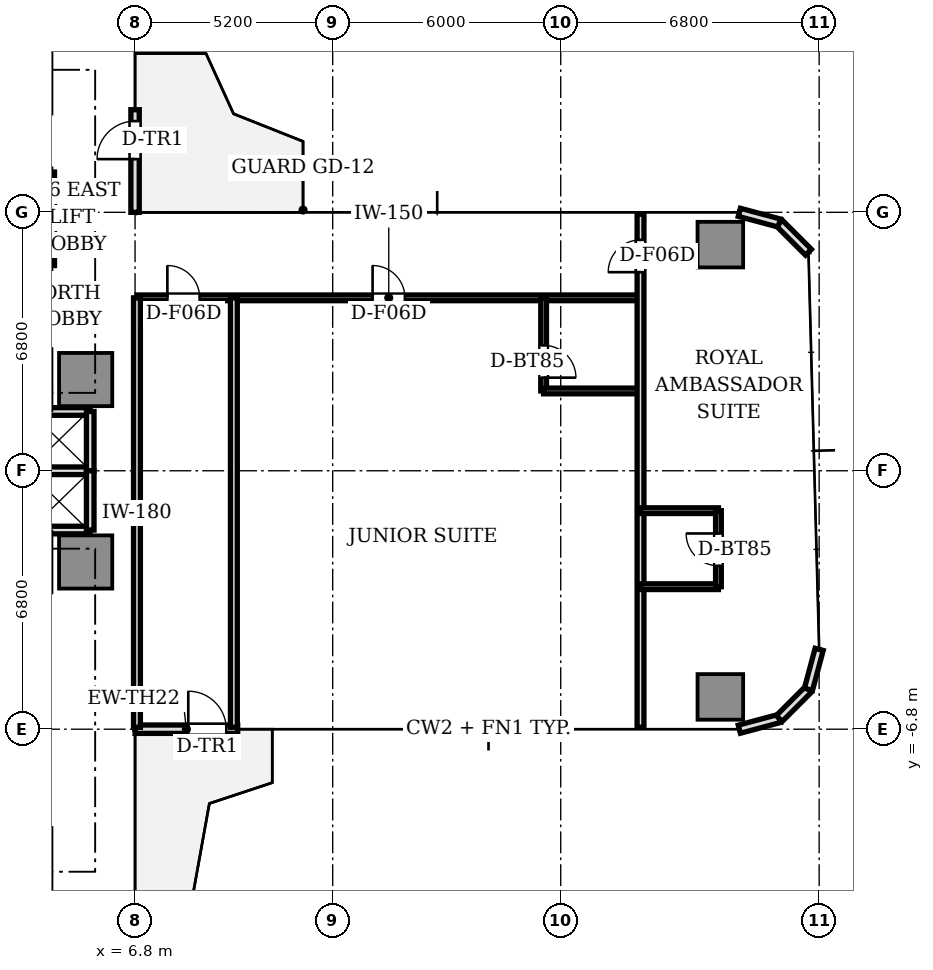
"""IFC4 building model, lengths in metres.
Left out: names, types, materials, properties, quantities, classifications, styles, units other than length and angle.
Written with IfcOpenShell. Run it as: python <this file> out.ifc"""

import sys

from ifc_helpers import new_model, si_unit, direction, frame, frame_2d, origin, origin_2d, place, context, subcontext, project, spatial, rectangle, extrude, source, transform, mapped, element, fill, save


model = new_model("IFC4")
c1 = context("Model", 3, precision=1e-05, world=origin(), true_north=direction((0.0, 1.0)))
c2 = subcontext(c1, "Body", "Model", "MODEL_VIEW")
j1 = project(units=[si_unit("LENGTHUNIT", "METRE"), si_unit("PLANEANGLEUNIT", "RADIAN")], contexts=[c1])
p1 = place(None, origin())
s1 = spatial("IfcSite", under=j1, at=p1, CompositionType="ELEMENT")
p2 = place(p1, origin())
s2 = spatial("IfcBuilding", under=s1, at=p2, CompositionType="ELEMENT")
p3 = place(p2, frame((0.0, 0.0, 61.1)))
s3 = spatial("IfcBuildingStorey", under=s2, at=p3, CompositionType="ELEMENT", Elevation=61.1)
m1 = source(origin(), c2, "Body", "SweptSolid", [
    extrude(rectangle(XDim=1.4, YDim=1.4, at=origin_2d()), origin(), (0.0, 0.0, 1.0), 3.11),
])
for number, where, z_axis, x_axis in (
    (1, (5.5, 2.4, 0.0), (0.0, 0.0, 1.0), (1.0, 0.0, 0.0)),
    (2, (5.5, -2.4, 0.0), (0.0, 0.0, 1.0), (1.0, 0.0, 0.0)),
):
    element("IfcColumn", number, at=place(p3, frame(where, z_axis=z_axis, x_axis=x_axis)), inside=s3, PredefinedType="COLUMN", context=c2, shape_type="MappedRepresentation", body=[
        mapped(m1, transform((0.0, 0.0, 0.0), scale=1.0)),
    ])
m2 = source(origin(), c2, "Body", "SweptSolid", [
    extrude(rectangle(XDim=1.2, YDim=1.2, at=origin_2d()), origin(), (0.0, 0.0, 1.0), 3.11),
])
for number, where, z_axis, x_axis in (
    (3, (22.2, -5.95, 0.0), (0.0, 0.0, 1.0), (1.0, 0.0, 0.0)),
    (4, (22.2, 5.95, 0.0), (0.0, 0.0, 1.0), (1.0, 0.0, 0.0)),
):
    element("IfcColumn", number, at=place(p3, frame(where, z_axis=z_axis, x_axis=x_axis)), inside=s3, PredefinedType="COLUMN", context=c2, shape_type="MappedRepresentation", body=[
        mapped(m2, transform((0.0, 0.0, 0.0), scale=1.0)),
    ])
p4 = place(p3, frame((6.8, -6.8, 0.0), z_axis=(0.0, 0.0, 1.0), x_axis=(1.0, 0.0, 0.0)))
e5 = element("IfcWall", 5, at=p4, inside=s3, PredefinedType="STANDARD", context=c2, shape_type="SweptSolid", body=[
    extrude(rectangle(XDim=2.7, YDim=0.22, at=frame_2d((1.35, 0.0))), origin(), (0.0, 0.0, 1.0), 3.11),
])
p5 = place(p4, frame((1.4, 0.0, 0.0)))
e6 = element("IfcOpeningElement", 6, at=p5, cuts=e5, PredefinedType="OPENING", context=c2, shape_type="SweptSolid", body=[
    extrude(rectangle(XDim=1.0, YDim=2.2, at=frame_2d((0.5, 1.1))), frame((0.0, 0.12, 0.0), z_axis=(0.0, -1.0, 0.0), x_axis=(1.0, 0.0, 0.0)), (0.0, 0.0, 1.0), 0.24),
])
for number, where, z_axis, x_axis in (
    (7, (22.7, -6.8, 0.0), (0.0, 0.0, 1.0), (0.966, 0.259, 0.0)),
    (8, (23.75, -6.519, 0.0), (0.0, 0.0, 1.0), (0.707, 0.707, 0.0)),
    (9, (24.519, -5.75, 0.0), (0.0, 0.0, 1.0), (0.259, 0.966, 0.0)),
    (10, (24.519, 5.75, 0.0), (0.0, 0.0, 1.0), (-0.707, 0.707, 0.0)),
    (11, (23.75, 6.519, 0.0), (0.0, 0.0, 1.0), (-0.966, 0.259, 0.0)),
):
    element("IfcWall", number, at=place(p3, frame(where, z_axis=z_axis, x_axis=x_axis)), inside=s3, PredefinedType="STANDARD", context=c2, shape_type="SweptSolid", body=[
        extrude(rectangle(XDim=1.087, YDim=0.22, at=frame_2d((0.543, 0.0))), origin(), (0.0, 0.0, 1.0), 3.11),
    ])
p6 = place(p3, frame((6.8, 6.8, 0.0), z_axis=(0.0, 0.0, 1.0), x_axis=(0.0, 1.0, 0.0)))
e12 = element("IfcWall", 12, at=p6, inside=s3, PredefinedType="STANDARD", context=c2, shape_type="SweptSolid", body=[
    extrude(rectangle(XDim=2.7, YDim=0.22, at=frame_2d((1.35, 0.0))), origin(), (0.0, 0.0, 1.0), 3.11),
])
p7 = place(p6, frame((1.4, 0.0, 0.0)))
e13 = element("IfcOpeningElement", 13, at=p7, cuts=e12, PredefinedType="OPENING", context=c2, shape_type="SweptSolid", body=[
    extrude(rectangle(XDim=1.0, YDim=2.2, at=frame_2d((0.5, 1.1))), frame((0.0, 0.12, 0.0), z_axis=(0.0, -1.0, 0.0), x_axis=(1.0, 0.0, 0.0)), (0.0, 0.0, 1.0), 0.24),
])
for number, where, z_axis, x_axis in (
    (14, (3.98, 1.56, 0.0), (0.0, 0.0, 1.0), (1.0, 0.0, 0.0)),
    (15, (3.98, -1.56, 0.0), (0.0, 0.0, 1.0), (1.0, 0.0, 0.0)),
    (16, (3.98, 0.0, 0.0), (0.0, 0.0, 1.0), (1.0, 0.0, 0.0)),
):
    element("IfcWall", number, at=place(p3, frame(where, z_axis=z_axis, x_axis=x_axis)), inside=s3, PredefinedType="SOLIDWALL", context=c2, shape_type="SweptSolid", body=[
        extrude(rectangle(XDim=1.64, YDim=0.2, at=frame_2d((0.82, 0.0))), origin(), (0.0, 0.0, 1.0), 2.66),
    ])
for number, where, z_axis, x_axis in (
    (17, (5.62, 0.0, 0.0), (0.0, 0.0, 1.0), (0.0, 1.0, 0.0)),
    (18, (5.62, -1.56, 0.0), (0.0, 0.0, 1.0), (0.0, 1.0, 0.0)),
):
    element("IfcWall", number, at=place(p3, frame(where, z_axis=z_axis, x_axis=x_axis)), inside=s3, PredefinedType="SOLIDWALL", context=c2, shape_type="SweptSolid", body=[
        extrude(rectangle(XDim=1.56, YDim=0.2, at=frame_2d((0.78, 0.0))), origin(), (0.0, 0.0, 1.0), 2.66),
    ])
p8 = place(p3, frame((4.58, 5.4, 0.0), z_axis=(0.0, 0.0, 1.0), x_axis=(0.0, 1.0, 0.0)))
e19 = element("IfcWall", 19, at=p8, inside=s3, PredefinedType="SOLIDWALL", context=c2, shape_type="SweptSolid", body=[
    extrude(rectangle(XDim=2.46, YDim=0.2, at=frame_2d((1.23, 0.0))), origin(), (0.0, 0.0, 1.0), 2.66),
])
p9 = place(p8, frame((0.2, 0.0, 0.0)))
e20 = element("IfcOpeningElement", 20, at=p9, cuts=e19, PredefinedType="OPENING", context=c2, shape_type="SweptSolid", body=[
    extrude(rectangle(XDim=0.85, YDim=2.1, at=frame_2d((0.425, 1.05))), frame((0.0, 0.11, 0.0), z_axis=(0.0, -1.0, 0.0), x_axis=(1.0, 0.0, 0.0)), (0.0, 0.0, 1.0), 0.22),
])
p10 = place(p8, frame((1.38, 0.0, 0.0)))
e21 = element("IfcOpeningElement", 21, at=p10, cuts=e19, PredefinedType="OPENING", context=c2, shape_type="SweptSolid", body=[
    extrude(rectangle(XDim=0.85, YDim=2.1, at=frame_2d((0.425, 1.05))), frame((0.0, 0.11, 0.0), z_axis=(0.0, -1.0, 0.0), x_axis=(1.0, 0.0, 0.0)), (0.0, 0.0, 1.0), 0.22),
])
p11 = place(p3, frame((6.85, 4.55, 0.0), z_axis=(0.0, 0.0, 1.0), x_axis=(1.0, 0.0, 0.0)))
e22 = element("IfcWall", 22, at=p11, inside=s3, PredefinedType="PARTITIONING", context=c2, shape_type="SweptSolid", body=[
    extrude(rectangle(XDim=13.25, YDim=0.15, at=frame_2d((6.625, 0.0))), origin(), (0.0, 0.0, 1.0), 2.63),
])
p12 = place(p11, frame((0.8, 0.0, 0.0)))
e23 = element("IfcOpeningElement", 23, at=p12, cuts=e22, PredefinedType="OPENING", context=c2, shape_type="SweptSolid", body=[
    extrude(rectangle(XDim=0.85, YDim=2.1, at=frame_2d((0.425, 1.05))), frame((0.0, 0.085, 0.0), z_axis=(0.0, -1.0, 0.0), x_axis=(1.0, 0.0, 0.0)), (0.0, 0.0, 1.0), 0.17),
])
p13 = place(p11, frame((6.2, 0.0, 0.0)))
e24 = element("IfcOpeningElement", 24, at=p13, cuts=e22, PredefinedType="OPENING", context=c2, shape_type="SweptSolid", body=[
    extrude(rectangle(XDim=0.85, YDim=2.1, at=frame_2d((0.425, 1.05))), frame((0.0, 0.085, 0.0), z_axis=(0.0, -1.0, 0.0), x_axis=(1.0, 0.0, 0.0)), (0.0, 0.0, 1.0), 0.17),
])
for number, where, z_axis, x_axis in (
    (25, (6.85, -6.75, 0.0), (0.0, 0.0, 1.0), (0.0, 1.0, 0.0)),
    (26, (9.4, 4.55, 0.0), (0.0, 0.0, 1.0), (0.0, -1.0, 0.0)),
):
    element("IfcWall", number, at=place(p3, frame(where, z_axis=z_axis, x_axis=x_axis)), inside=s3, PredefinedType="PARTITIONING", context=c2, shape_type="SweptSolid", body=[
        extrude(rectangle(XDim=11.3, YDim=0.18, at=frame_2d((5.65, 0.0))), origin(), (0.0, 0.0, 1.0), 2.66),
    ])
p14 = place(p3, frame((17.55, 4.55, 0.0), z_axis=(0.0, 0.0, 1.0), x_axis=(0.0, -1.0, 0.0)))
e27 = element("IfcWall", 27, at=p14, inside=s3, PredefinedType="PARTITIONING", context=c2, shape_type="SweptSolid", body=[
    extrude(rectangle(XDim=2.45, YDim=0.15, at=frame_2d((1.225, 0.0))), origin(), (0.0, 0.0, 1.0), 2.66),
])
p15 = place(p14, frame((1.25, 0.0, 0.0)))
e28 = element("IfcOpeningElement", 28, at=p15, cuts=e27, PredefinedType="OPENING", context=c2, shape_type="SweptSolid", body=[
    extrude(rectangle(XDim=0.85, YDim=2.1, at=frame_2d((0.425, 1.05))), frame((0.0, 0.085, 0.0), z_axis=(0.0, -1.0, 0.0), x_axis=(1.0, 0.0, 0.0)), (0.0, 0.0, 1.0), 0.17),
])
p16 = place(p3, frame((17.55, 2.1, 0.0), z_axis=(0.0, 0.0, 1.0), x_axis=(1.0, 0.0, 0.0)))
e29 = element("IfcWall", 29, at=p16, inside=s3, PredefinedType="PARTITIONING", context=c2, shape_type="SweptSolid", body=[
    extrude(rectangle(XDim=2.55, YDim=0.15, at=frame_2d((1.275, 0.0))), origin(), (0.0, 0.0, 1.0), 2.66),
])
p17 = place(p3, frame((20.1, -6.75, 0.0), z_axis=(0.0, 0.0, 1.0), x_axis=(0.0, 1.0, 0.0)))
e30 = element("IfcWall", 30, at=p17, inside=s3, PredefinedType="PARTITIONING", context=c2, shape_type="SweptSolid", body=[
    extrude(rectangle(XDim=13.5, YDim=0.18, at=frame_2d((6.75, 0.0))), origin(), (0.0, 0.0, 1.0), 2.66),
])
p18 = place(p17, frame((11.975, 0.0, 0.0)))
e31 = element("IfcOpeningElement", 31, at=p18, cuts=e30, PredefinedType="OPENING", context=c2, shape_type="SweptSolid", body=[
    extrude(rectangle(XDim=0.85, YDim=2.1, at=frame_2d((0.425, 1.05))), frame((0.0, 0.1, 0.0), z_axis=(0.0, -1.0, 0.0), x_axis=(1.0, 0.0, 0.0)), (0.0, 0.0, 1.0), 0.2),
])
p19 = place(p3, frame((20.1, -1.05, 0.0), z_axis=(0.0, 0.0, 1.0), x_axis=(1.0, 0.0, 0.0)))
e32 = element("IfcWall", 32, at=p19, inside=s3, PredefinedType="PARTITIONING", context=c2, shape_type="SweptSolid", body=[
    extrude(rectangle(XDim=2.05, YDim=0.15, at=frame_2d((1.025, 0.0))), origin(), (0.0, 0.0, 1.0), 2.66),
])
p20 = place(p3, frame((20.1, -3.05, 0.0), z_axis=(0.0, 0.0, 1.0), x_axis=(1.0, 0.0, 0.0)))
e33 = element("IfcWall", 33, at=p20, inside=s3, PredefinedType="PARTITIONING", context=c2, shape_type="SweptSolid", body=[
    extrude(rectangle(XDim=2.05, YDim=0.15, at=frame_2d((1.025, 0.0))), origin(), (0.0, 0.0, 1.0), 2.63),
])
p21 = place(p3, frame((22.15, -3.05, 0.0), z_axis=(0.0, 0.0, 1.0), x_axis=(0.0, 1.0, 0.0)))
e34 = element("IfcWall", 34, at=p21, inside=s3, PredefinedType="PARTITIONING", context=c2, shape_type="SweptSolid", body=[
    extrude(rectangle(XDim=2.0, YDim=0.15, at=frame_2d((1.0, 0.0))), origin(), (0.0, 0.0, 1.0), 2.58),
])
p22 = place(p21, frame((0.55, 0.0, 0.0)))
e35 = element("IfcOpeningElement", 35, at=p22, cuts=e34, PredefinedType="OPENING", context=c2, shape_type="SweptSolid", body=[
    extrude(rectangle(XDim=0.85, YDim=2.1, at=frame_2d((0.425, 1.05))), frame((0.0, 0.085, 0.0), z_axis=(0.0, -1.0, 0.0), x_axis=(1.0, 0.0, 0.0)), (0.0, 0.0, 1.0), 0.17),
])
m3 = source(origin(), c2, "Body", "SweptSolid", [
    extrude(rectangle(XDim=1.0, YDim=0.05, at=origin_2d()), origin(), (0.0, 0.0, 1.0), 2.2),
])
p23 = place(p5, frame((0.5, 0.0, 0.0)))
e36 = element("IfcDoor", 36, at=p23, inside=s3, OperationType="SINGLE_SWING_LEFT", PredefinedType="DOOR", context=c2, shape_type="MappedRepresentation", body=[
    mapped(m3, transform((0.0, 0.0, 0.0), scale=1.0)),
])
fill(e6, e36)
p24 = place(p7, frame((0.5, 0.0, 0.0)))
e37 = element("IfcDoor", 37, at=p24, inside=s3, OperationType="SINGLE_SWING_LEFT", PredefinedType="DOOR", context=c2, shape_type="MappedRepresentation", body=[
    mapped(m3, transform((0.0, 0.0, 0.0), scale=1.0)),
])
fill(e13, e37)
m4 = source(origin(), c2, "Body", "SweptSolid", [
    extrude(rectangle(XDim=0.85, YDim=0.05, at=origin_2d()), origin(), (0.0, 0.0, 1.0), 2.1),
])
p25 = place(p12, frame((0.425, 0.0, 0.0)))
e38 = element("IfcDoor", 38, at=p25, inside=s3, OperationType="SINGLE_SWING_LEFT", PredefinedType="DOOR", context=c2, shape_type="MappedRepresentation", body=[
    mapped(m4, transform((0.0, 0.0, 0.0), scale=1.0)),
])
fill(e23, e38)
p26 = place(p15, frame((0.425, 0.0, 0.0)))
e39 = element("IfcDoor", 39, at=p26, inside=s3, OperationType="SINGLE_SWING_RIGHT", PredefinedType="DOOR", context=c2, shape_type="MappedRepresentation", body=[
    mapped(m4, transform((0.0, 0.0, 0.0), scale=1.0)),
])
fill(e28, e39)
p27 = place(p13, frame((0.425, 0.0, 0.0)))
e40 = element("IfcDoor", 40, at=p27, inside=s3, OperationType="SINGLE_SWING_LEFT", PredefinedType="DOOR", context=c2, shape_type="MappedRepresentation", body=[
    mapped(m4, transform((0.0, 0.0, 0.0), scale=1.0)),
])
fill(e24, e40)
p28 = place(p22, frame((0.425, 0.0, 0.0)))
e41 = element("IfcDoor", 41, at=p28, inside=s3, OperationType="SINGLE_SWING_RIGHT", PredefinedType="DOOR", context=c2, shape_type="MappedRepresentation", body=[
    mapped(m4, transform((0.0, 0.0, 0.0), scale=1.0)),
])
fill(e35, e41)
p29 = place(p18, frame((0.425, 0.0, 0.0)))
e42 = element("IfcDoor", 42, at=p29, inside=s3, OperationType="SINGLE_SWING_LEFT", PredefinedType="DOOR", context=c2, shape_type="MappedRepresentation", body=[
    mapped(m4, transform((0.0, 0.0, 0.0), scale=1.0)),
])
fill(e31, e42)
save(model, sys.argv[1])
